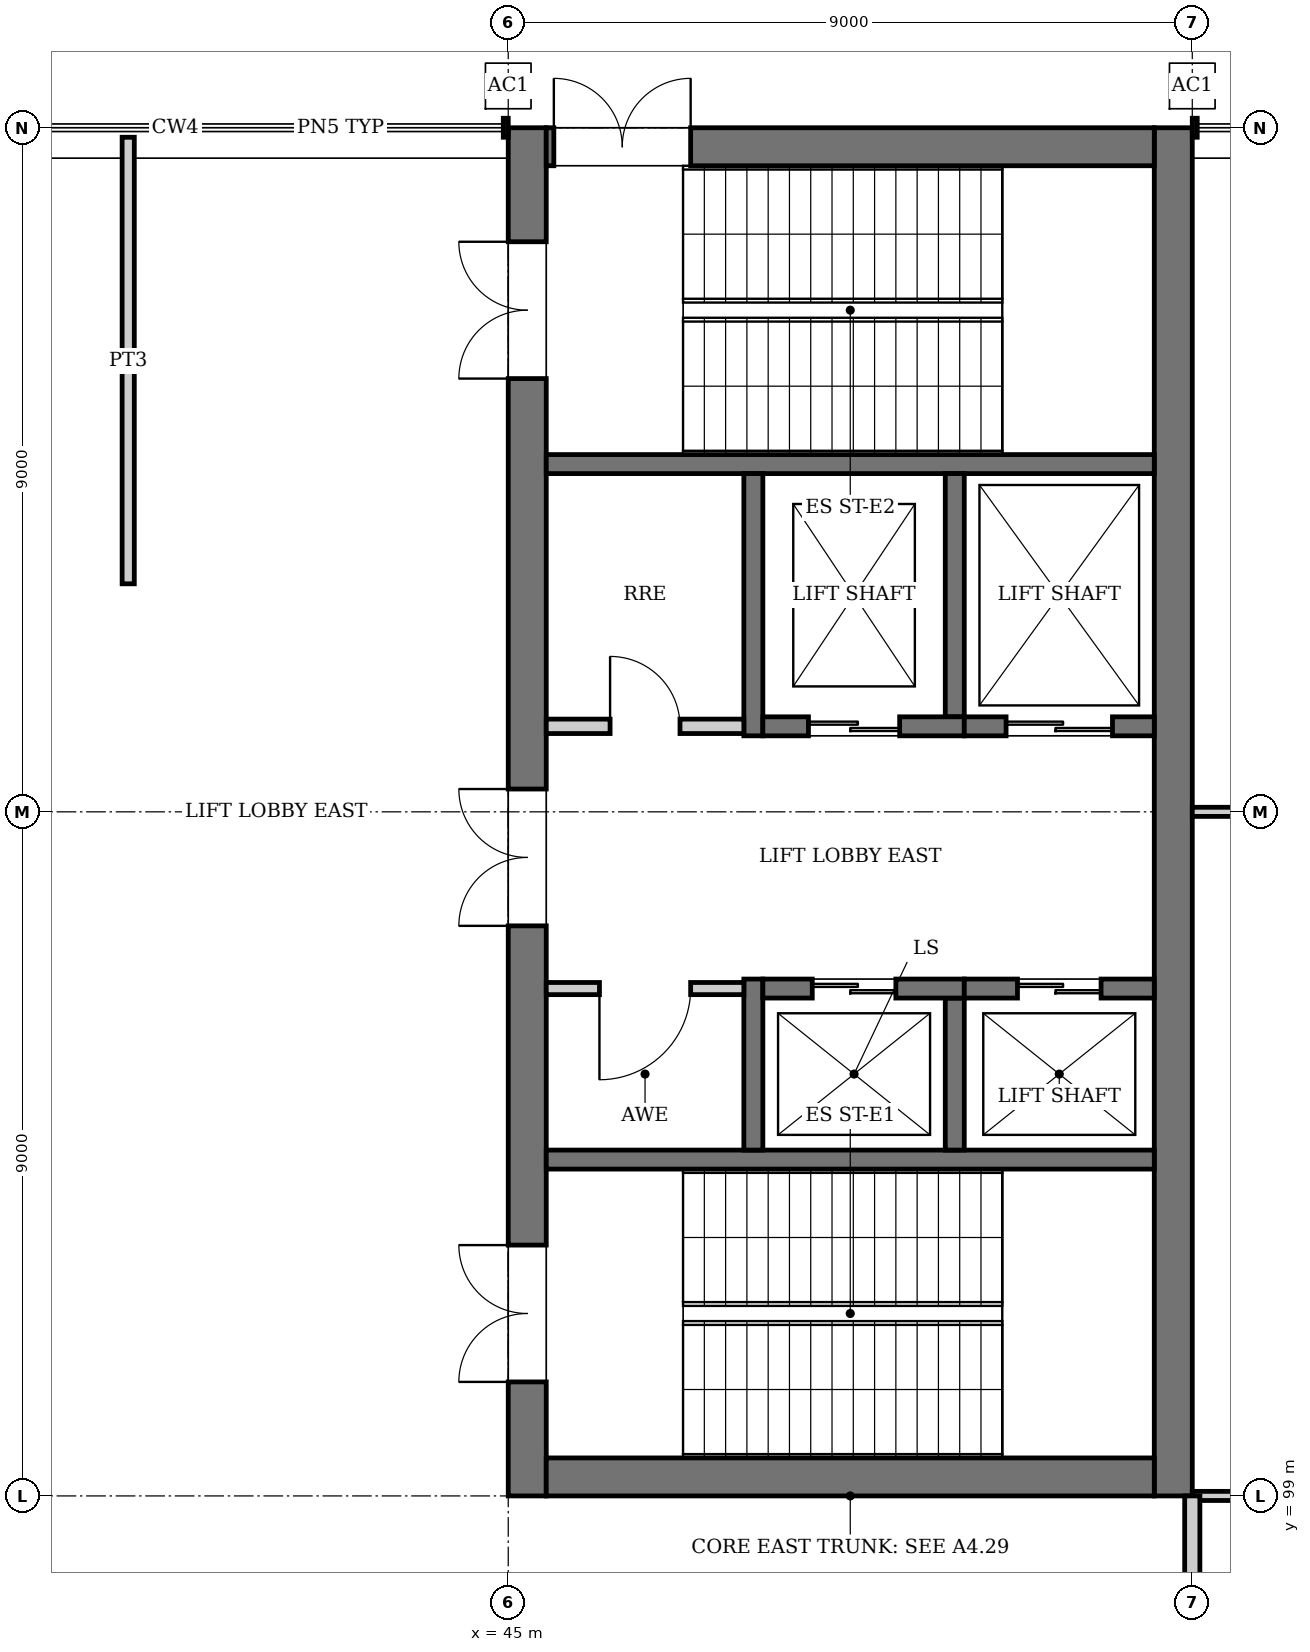
"""IFC4 building model, lengths in metres.
Left out: names, types, materials, properties, quantities, classifications, styles, units other than length and angle.
Written with IfcOpenShell. Run it as: python <this file> out.ifc"""

import sys

from ifc_helpers import new_model, si_unit, direction, frame, frame_2d, origin, origin_2d, place, context, subcontext, project, spatial, rectangle, hollow_rectangle, extrude, element, fill, save


model = new_model("IFC4")
c1 = context("Model", 3, precision=1e-05, world=origin(), true_north=direction((0.0, 1.0)))
c2 = subcontext(c1, "Body", "Model", "MODEL_VIEW")
j1 = project(units=[si_unit("LENGTHUNIT", "METRE"), si_unit("PLANEANGLEUNIT", "RADIAN")], contexts=[c1])
p1 = place(None, origin())
s1 = spatial("IfcSite", under=j1, at=p1, CompositionType="ELEMENT")
p2 = place(p1, origin())
s2 = spatial("IfcBuilding", under=s1, at=p2, CompositionType="ELEMENT")
p3 = place(p2, origin())
s3 = spatial("IfcBuildingStorey", under=s2, at=p3, CompositionType="ELEMENT", Elevation=0.0)
p4 = place(p3, frame((45.25, 99.0, 0.0), z_axis=(0.0, 0.0, 1.0), x_axis=(0.0, 1.0, 0.0)))
e1 = element("IfcWall", 1, at=p4, inside=s3, PredefinedType="SHEAR", context=c2, shape_type="SweptSolid", body=[
    extrude(rectangle(XDim=18.0, YDim=0.5, at=frame_2d((9.0, 0.0))), origin(), (0.0, 0.0, 1.0), 6.0),
])
p5 = place(p4, frame((1.5, 0.0, 0.0)))
e2 = element("IfcOpeningElement", 2, at=p5, cuts=e1, PredefinedType="OPENING", context=c2, shape_type="SweptSolid", body=[
    extrude(rectangle(XDim=1.8, YDim=2.1, at=frame_2d((0.9, 1.05))), frame((0.0, 0.26, 0.0), z_axis=(0.0, -1.0, 0.0), x_axis=(1.0, 0.0, 0.0)), (0.0, 0.0, 1.0), 0.52),
])
p6 = place(p4, frame((14.7, 0.0, 0.0)))
e3 = element("IfcOpeningElement", 3, at=p6, cuts=e1, PredefinedType="OPENING", context=c2, shape_type="SweptSolid", body=[
    extrude(rectangle(XDim=1.8, YDim=2.1, at=frame_2d((0.9, 1.05))), frame((0.0, 0.26, 0.0), z_axis=(0.0, -1.0, 0.0), x_axis=(1.0, 0.0, 0.0)), (0.0, 0.0, 1.0), 0.52),
])
p7 = place(p4, frame((7.5, 0.0, 0.0)))
e4 = element("IfcOpeningElement", 4, at=p7, cuts=e1, PredefinedType="OPENING", context=c2, shape_type="SweptSolid", body=[
    extrude(rectangle(XDim=1.8, YDim=2.1, at=frame_2d((0.9, 1.05))), frame((0.0, 0.26, 0.0), z_axis=(0.0, -1.0, 0.0), x_axis=(1.0, 0.0, 0.0)), (0.0, 0.0, 1.0), 0.52),
])
p8 = place(p3, frame((53.75, 99.0, 0.0), z_axis=(0.0, 0.0, 1.0), x_axis=(0.0, 1.0, 0.0)))
e5 = element("IfcWall", 5, at=p8, inside=s3, PredefinedType="SHEAR", context=c2, shape_type="SweptSolid", body=[
    extrude(rectangle(XDim=18.0, YDim=0.5, at=frame_2d((9.0, 0.0))), origin(), (0.0, 0.0, 1.0), 6.0),
])
p9 = place(p3, frame((45.5, 99.25, 0.0), z_axis=(0.0, 0.0, 1.0), x_axis=(1.0, 0.0, 0.0)))
e6 = element("IfcWall", 6, at=p9, inside=s3, PredefinedType="SHEAR", context=c2, shape_type="SweptSolid", body=[
    extrude(rectangle(XDim=8.0, YDim=0.5, at=frame_2d((4.0, 0.0))), origin(), (0.0, 0.0, 1.0), 6.0),
])
p10 = place(p3, frame((45.5, 116.75, 0.0), z_axis=(0.0, 0.0, 1.0), x_axis=(1.0, 0.0, 0.0)))
e7 = element("IfcWall", 7, at=p10, inside=s3, PredefinedType="SHEAR", context=c2, shape_type="SweptSolid", body=[
    extrude(rectangle(XDim=8.0, YDim=0.5, at=frame_2d((4.0, 0.0))), origin(), (0.0, 0.0, 1.0), 6.0),
])
p11 = place(p10, frame((0.1, 0.0, 0.0)))
e8 = element("IfcOpeningElement", 8, at=p11, cuts=e7, PredefinedType="OPENING", context=c2, shape_type="SweptSolid", body=[
    extrude(rectangle(XDim=1.8, YDim=2.4, at=frame_2d((0.9, 1.2))), frame((0.0, 0.26, 0.0), z_axis=(0.0, -1.0, 0.0), x_axis=(1.0, 0.0, 0.0)), (0.0, 0.0, 1.0), 0.52),
])
p12 = place(p3, frame((54.0, 99.0, 0.0), z_axis=(0.0, 0.0, 1.0), x_axis=(1.0, 0.0, 0.0)))
e9 = element("IfcWall", 9, at=p12, inside=s3, PredefinedType="PARTITIONING", context=c2, shape_type="SweptSolid", body=[
    extrude(rectangle(XDim=8.836, YDim=0.12, at=frame_2d((4.418, 0.0))), origin(), (0.0, 0.0, 1.0), 5.322),
])
p13 = place(p12, frame((1.55, 0.0, 0.0)))
e10 = element("IfcOpeningElement", 10, at=p13, cuts=e9, PredefinedType="OPENING", context=c2, shape_type="SweptSolid", body=[
    extrude(rectangle(XDim=1.8, YDim=2.1, at=frame_2d((0.9, 1.05))), frame((0.0, 0.07, 0.0), z_axis=(0.0, -1.0, 0.0), x_axis=(1.0, 0.0, 0.0)), (0.0, 0.0, 1.0), 0.14),
])
p14 = place(p12, frame((6.55, 0.0, 0.0)))
e11 = element("IfcOpeningElement", 11, at=p14, cuts=e9, PredefinedType="OPENING", context=c2, shape_type="SweptSolid", body=[
    extrude(rectangle(XDim=1.8, YDim=2.1, at=frame_2d((0.9, 1.05))), frame((0.0, 0.07, 0.0), z_axis=(0.0, -1.0, 0.0), x_axis=(1.0, 0.0, 0.0)), (0.0, 0.0, 1.0), 0.14),
])
p15 = place(p3, frame((54.0, 108.0, 0.0), z_axis=(0.0, 0.0, 1.0), x_axis=(1.0, 0.0, 0.0)))
e12 = element("IfcWall", 12, at=p15, inside=s3, PredefinedType="PARTITIONING", context=c2, shape_type="SweptSolid", body=[
    extrude(rectangle(XDim=9.0, YDim=0.12, at=frame_2d((4.5, 0.0))), origin(), (0.0, 0.0, 1.0), 5.322),
])
p16 = place(p15, frame((3.55, 0.0, 0.0)))
e13 = element("IfcOpeningElement", 13, at=p16, cuts=e12, PredefinedType="OPENING", context=c2, shape_type="SweptSolid", body=[
    extrude(rectangle(XDim=1.8, YDim=2.1, at=frame_2d((0.9, 1.05))), frame((0.0, 0.07, 0.0), z_axis=(0.0, -1.0, 0.0), x_axis=(1.0, 0.0, 0.0)), (0.0, 0.0, 1.0), 0.14),
])
p17 = place(p3, frame((40.0, 111.0, 0.0), z_axis=(0.0, 0.0, 1.0), x_axis=(0.0, 1.0, 0.0)))
e14 = element("IfcWall", 14, at=p17, inside=s3, PredefinedType="PARTITIONING", context=c2, shape_type="SweptSolid", body=[
    extrude(rectangle(XDim=5.875, YDim=0.16, at=frame_2d((2.938, 0.0))), origin(), (0.0, 0.0, 1.0), 5.85),
])
p18 = place(p3, frame((54.0, 96.08, 0.0), z_axis=(0.0, 0.0, 1.0), x_axis=(0.0, 1.0, 0.0)))
e15 = element("IfcWall", 15, at=p18, inside=s3, PredefinedType="PARTITIONING", context=c2, shape_type="SweptSolid", body=[
    extrude(rectangle(XDim=2.92, YDim=0.2, at=frame_2d((1.46, 0.0))), origin(), (0.0, 0.0, 1.0), 5.322),
])
for number, where, z_axis, x_axis in (
    (16, (45.0, 117.55, 0.0), (0.0, 0.0, 1.0), (1.0, 0.0, 0.0)),
    (17, (54.0, 117.55, 0.0), (0.0, 0.0, 1.0), (1.0, 0.0, 0.0)),
):
    element("IfcColumn", number, at=place(p3, frame(where, z_axis=z_axis, x_axis=x_axis)), inside=s3, PredefinedType="COLUMN", context=c2, shape_type="SweptSolid", body=[
        extrude(hollow_rectangle(XDim=0.15, YDim=0.15, WallThickness=0.009, at=origin_2d()), origin(), (0.0, 0.0, 1.0), 3.715),
    ])
for number, where, z_axis, x_axis in (
    (18, (45.5, 103.425, 0.0), (0.0, 0.0, 1.0), (1.0, 0.0, 0.0)),
    (19, (45.5, 112.575, 0.0), (0.0, 0.0, 1.0), (1.0, 0.0, 0.0)),
):
    element("IfcWall", number, at=place(p3, frame(where, z_axis=z_axis, x_axis=x_axis)), inside=s3, PredefinedType="SOLIDWALL", context=c2, shape_type="SweptSolid", body=[
        extrude(rectangle(XDim=8.0, YDim=0.25, at=frame_2d((4.0, 0.0))), origin(), (0.0, 0.0, 1.0), 5.75),
    ])
p19 = place(p3, frame((48.225, 103.55, 0.0), z_axis=(0.0, 0.0, 1.0), x_axis=(0.0, 1.0, 0.0)))
e20 = element("IfcWall", 20, at=p19, inside=s3, PredefinedType="SOLIDWALL", context=c2, shape_type="SweptSolid", body=[
    extrude(rectangle(XDim=2.25, YDim=0.25, at=frame_2d((1.125, 0.0))), origin(), (0.0, 0.0, 1.0), 6.0),
])
p20 = place(p3, frame((50.875, 103.55, 0.0), z_axis=(0.0, 0.0, 1.0), x_axis=(0.0, 1.0, 0.0)))
e21 = element("IfcWall", 21, at=p20, inside=s3, PredefinedType="SOLIDWALL", context=c2, shape_type="SweptSolid", body=[
    extrude(rectangle(XDim=2.0, YDim=0.25, at=frame_2d((1.0, 0.0))), origin(), (0.0, 0.0, 1.0), 6.0),
])
p21 = place(p3, frame((48.35, 105.675, 0.0), z_axis=(0.0, 0.0, 1.0), x_axis=(1.0, 0.0, 0.0)))
e22 = element("IfcWall", 22, at=p21, inside=s3, PredefinedType="SOLIDWALL", context=c2, shape_type="SweptSolid", body=[
    extrude(rectangle(XDim=2.65, YDim=0.25, at=frame_2d((1.325, 0.0))), origin(), (0.0, 0.0, 1.0), 6.0),
])
p22 = place(p21, frame((0.65, 0.0, 0.0)))
e23 = element("IfcOpeningElement", 23, at=p22, cuts=e22, PredefinedType="OPENING", context=c2, shape_type="SweptSolid", body=[
    extrude(rectangle(XDim=1.1, YDim=2.1, at=frame_2d((0.55, 1.05))), frame((0.0, 0.135, 0.0), z_axis=(0.0, -1.0, 0.0), x_axis=(1.0, 0.0, 0.0)), (0.0, 0.0, 1.0), 0.27),
])
p23 = place(p3, frame((51.0, 105.675, 0.0), z_axis=(0.0, 0.0, 1.0), x_axis=(1.0, 0.0, 0.0)))
e24 = element("IfcWall", 24, at=p23, inside=s3, PredefinedType="SOLIDWALL", context=c2, shape_type="SweptSolid", body=[
    extrude(rectangle(XDim=2.5, YDim=0.25, at=frame_2d((1.25, 0.0))), origin(), (0.0, 0.0, 1.0), 6.0),
])
p24 = place(p23, frame((0.7, 0.0, 0.0)))
e25 = element("IfcOpeningElement", 25, at=p24, cuts=e24, PredefinedType="OPENING", context=c2, shape_type="SweptSolid", body=[
    extrude(rectangle(XDim=1.1, YDim=2.1, at=frame_2d((0.55, 1.05))), frame((0.0, 0.135, 0.0), z_axis=(0.0, -1.0, 0.0), x_axis=(1.0, 0.0, 0.0)), (0.0, 0.0, 1.0), 0.27),
])
p25 = place(p3, frame((48.225, 109.0, 0.0), z_axis=(0.0, 0.0, 1.0), x_axis=(0.0, 1.0, 0.0)))
e26 = element("IfcWall", 26, at=p25, inside=s3, PredefinedType="SOLIDWALL", context=c2, shape_type="SweptSolid", body=[
    extrude(rectangle(XDim=3.45, YDim=0.25, at=frame_2d((1.725, 0.0))), origin(), (0.0, 0.0, 1.0), 6.0),
])
p26 = place(p3, frame((50.875, 109.25, 0.0), z_axis=(0.0, 0.0, 1.0), x_axis=(0.0, 1.0, 0.0)))
e27 = element("IfcWall", 27, at=p26, inside=s3, PredefinedType="SOLIDWALL", context=c2, shape_type="SweptSolid", body=[
    extrude(rectangle(XDim=3.2, YDim=0.25, at=frame_2d((1.6, 0.0))), origin(), (0.0, 0.0, 1.0), 6.0),
])
p27 = place(p3, frame((48.35, 109.125, 0.0), z_axis=(0.0, 0.0, 1.0), x_axis=(1.0, 0.0, 0.0)))
e28 = element("IfcWall", 28, at=p27, inside=s3, PredefinedType="SOLIDWALL", context=c2, shape_type="SweptSolid", body=[
    extrude(rectangle(XDim=2.65, YDim=0.25, at=frame_2d((1.325, 0.0))), origin(), (0.0, 0.0, 1.0), 6.0),
])
p28 = place(p27, frame((0.6, 0.0, 0.0)))
e29 = element("IfcOpeningElement", 29, at=p28, cuts=e28, PredefinedType="OPENING", context=c2, shape_type="SweptSolid", body=[
    extrude(rectangle(XDim=1.2, YDim=2.1, at=frame_2d((0.6, 1.05))), frame((0.0, 0.135, 0.0), z_axis=(0.0, -1.0, 0.0), x_axis=(1.0, 0.0, 0.0)), (0.0, 0.0, 1.0), 0.27),
])
p29 = place(p3, frame((51.0, 109.125, 0.0), z_axis=(0.0, 0.0, 1.0), x_axis=(1.0, 0.0, 0.0)))
e30 = element("IfcWall", 30, at=p29, inside=s3, PredefinedType="SOLIDWALL", context=c2, shape_type="SweptSolid", body=[
    extrude(rectangle(XDim=2.5, YDim=0.25, at=frame_2d((1.25, 0.0))), origin(), (0.0, 0.0, 1.0), 6.0),
])
p30 = place(p29, frame((0.55, 0.0, 0.0)))
e31 = element("IfcOpeningElement", 31, at=p30, cuts=e30, PredefinedType="OPENING", context=c2, shape_type="SweptSolid", body=[
    extrude(rectangle(XDim=1.4, YDim=2.4, at=frame_2d((0.7, 1.2))), frame((0.0, 0.135, 0.0), z_axis=(0.0, -1.0, 0.0), x_axis=(1.0, 0.0, 0.0)), (0.0, 0.0, 1.0), 0.27),
])
p31 = place(p3, frame((45.5, 105.675, 0.0), z_axis=(0.0, 0.0, 1.0), x_axis=(1.0, 0.0, 0.0)))
e32 = element("IfcWall", 32, at=p31, inside=s3, PredefinedType="PARTITIONING", context=c2, shape_type="SweptSolid", body=[
    extrude(rectangle(XDim=2.6, YDim=0.16, at=frame_2d((1.3, 0.0))), origin(), (0.0, 0.0, 1.0), 5.75),
])
p32 = place(p31, frame((0.7, 0.0, 0.0)))
e33 = element("IfcOpeningElement", 33, at=p32, cuts=e32, PredefinedType="OPENING", context=c2, shape_type="SweptSolid", body=[
    extrude(rectangle(XDim=1.2, YDim=2.1, at=frame_2d((0.6, 1.05))), frame((0.0, 0.09, 0.0), z_axis=(0.0, -1.0, 0.0), x_axis=(1.0, 0.0, 0.0)), (0.0, 0.0, 1.0), 0.18),
])
p33 = place(p3, frame((45.5, 109.125, 0.0), z_axis=(0.0, 0.0, 1.0), x_axis=(1.0, 0.0, 0.0)))
e34 = element("IfcWall", 34, at=p33, inside=s3, PredefinedType="PARTITIONING", context=c2, shape_type="SweptSolid", body=[
    extrude(rectangle(XDim=2.6, YDim=0.19, at=frame_2d((1.3, 0.0))), origin(), (0.0, 0.0, 1.0), 5.75),
])
p34 = place(p33, frame((0.84, 0.0, 0.0)))
e35 = element("IfcOpeningElement", 35, at=p34, cuts=e34, PredefinedType="OPENING", context=c2, shape_type="SweptSolid", body=[
    extrude(rectangle(XDim=0.92, YDim=2.1, at=frame_2d((0.46, 1.05))), frame((0.0, 0.105, 0.0), z_axis=(0.0, -1.0, 0.0), x_axis=(1.0, 0.0, 0.0)), (0.0, 0.0, 1.0), 0.21),
])
p35 = place(p11, origin())
e36 = element("IfcDoor", 36, at=p35, inside=s3, OperationType="DOUBLE_DOOR_SINGLE_SWING", PredefinedType="DOOR", context=c2, shape_type="SweptSolid", body=[
    extrude(rectangle(XDim=1.8, YDim=2.4, at=frame_2d((0.9, 1.2))), frame((0.0, 0.025, 0.0), z_axis=(0.0, -1.0, 0.0), x_axis=(1.0, 0.0, 0.0)), (0.0, 0.0, 1.0), 0.05),
])
fill(e8, e36)
p36 = place(p22, origin())
e37 = element("IfcDoor", 37, at=p36, inside=s3, OperationType="DOUBLE_DOOR_SLIDING", PredefinedType="DOOR", context=c2, shape_type="SweptSolid", body=[
    extrude(rectangle(XDim=1.1, YDim=2.1, at=frame_2d((0.55, 1.05))), frame((0.0, 0.025, 0.0), z_axis=(0.0, -1.0, 0.0), x_axis=(1.0, 0.0, 0.0)), (0.0, 0.0, 1.0), 0.05),
])
fill(e23, e37)
p37 = place(p24, origin())
e38 = element("IfcDoor", 38, at=p37, inside=s3, OperationType="DOUBLE_DOOR_SLIDING", PredefinedType="DOOR", context=c2, shape_type="SweptSolid", body=[
    extrude(rectangle(XDim=1.1, YDim=2.1, at=frame_2d((0.55, 1.05))), frame((0.0, 0.025, 0.0), z_axis=(0.0, -1.0, 0.0), x_axis=(1.0, 0.0, 0.0)), (0.0, 0.0, 1.0), 0.05),
])
fill(e25, e38)
p38 = place(p28, origin())
e39 = element("IfcDoor", 39, at=p38, inside=s3, OperationType="DOUBLE_DOOR_SLIDING", PredefinedType="DOOR", context=c2, shape_type="SweptSolid", body=[
    extrude(rectangle(XDim=1.2, YDim=2.1, at=frame_2d((0.6, 1.05))), frame((0.0, 0.025, 0.0), z_axis=(0.0, -1.0, 0.0), x_axis=(1.0, 0.0, 0.0)), (0.0, 0.0, 1.0), 0.05),
])
fill(e29, e39)
p39 = place(p30, origin())
e40 = element("IfcDoor", 40, at=p39, inside=s3, OperationType="DOUBLE_DOOR_SLIDING", PredefinedType="DOOR", context=c2, shape_type="SweptSolid", body=[
    extrude(rectangle(XDim=1.4, YDim=2.4, at=frame_2d((0.7, 1.2))), frame((0.0, 0.025, 0.0), z_axis=(0.0, -1.0, 0.0), x_axis=(1.0, 0.0, 0.0)), (0.0, 0.0, 1.0), 0.05),
])
fill(e31, e40)
p40 = place(p5, origin())
e41 = element("IfcDoor", 41, at=p40, inside=s3, OperationType="DOUBLE_DOOR_SINGLE_SWING", PredefinedType="DOOR", context=c2, shape_type="SweptSolid", body=[
    extrude(rectangle(XDim=1.8, YDim=2.1, at=frame_2d((0.9, 1.05))), frame((0.0, 0.025, 0.0), z_axis=(0.0, -1.0, 0.0), x_axis=(1.0, 0.0, 0.0)), (0.0, 0.0, 1.0), 0.05),
])
fill(e2, e41)
p41 = place(p6, origin())
e42 = element("IfcDoor", 42, at=p41, inside=s3, OperationType="DOUBLE_DOOR_SINGLE_SWING", PredefinedType="DOOR", context=c2, shape_type="SweptSolid", body=[
    extrude(rectangle(XDim=1.8, YDim=2.1, at=frame_2d((0.9, 1.05))), frame((0.0, 0.025, 0.0), z_axis=(0.0, -1.0, 0.0), x_axis=(1.0, 0.0, 0.0)), (0.0, 0.0, 1.0), 0.05),
])
fill(e3, e42)
p42 = place(p7, origin())
e43 = element("IfcDoor", 43, at=p42, inside=s3, OperationType="DOUBLE_DOOR_SINGLE_SWING", PredefinedType="DOOR", context=c2, shape_type="SweptSolid", body=[
    extrude(rectangle(XDim=1.8, YDim=2.1, at=frame_2d((0.9, 1.05))), frame((0.0, 0.025, 0.0), z_axis=(0.0, -1.0, 0.0), x_axis=(1.0, 0.0, 0.0)), (0.0, 0.0, 1.0), 0.05),
])
fill(e4, e43)
p43 = place(p32, frame((1.2, 0.0, 0.0), z_axis=(0.0, 0.0, 1.0), x_axis=(-1.0, 0.0, 0.0)))
e44 = element("IfcDoor", 44, at=p43, inside=s3, OperationType="SINGLE_SWING_RIGHT", PredefinedType="DOOR", context=c2, shape_type="SweptSolid", body=[
    extrude(rectangle(XDim=1.2, YDim=2.1, at=frame_2d((0.6, 1.05))), frame((0.0, 0.025, 0.0), z_axis=(0.0, -1.0, 0.0), x_axis=(1.0, 0.0, 0.0)), (0.0, 0.0, 1.0), 0.05),
])
fill(e33, e44)
p44 = place(p34, origin())
e45 = element("IfcDoor", 45, at=p44, inside=s3, OperationType="SINGLE_SWING_LEFT", PredefinedType="DOOR", context=c2, shape_type="SweptSolid", body=[
    extrude(rectangle(XDim=0.92, YDim=2.1, at=frame_2d((0.46, 1.05))), frame((0.0, 0.025, 0.0), z_axis=(0.0, -1.0, 0.0), x_axis=(1.0, 0.0, 0.0)), (0.0, 0.0, 1.0), 0.05),
])
fill(e35, e45)
save(model, sys.argv[1])
